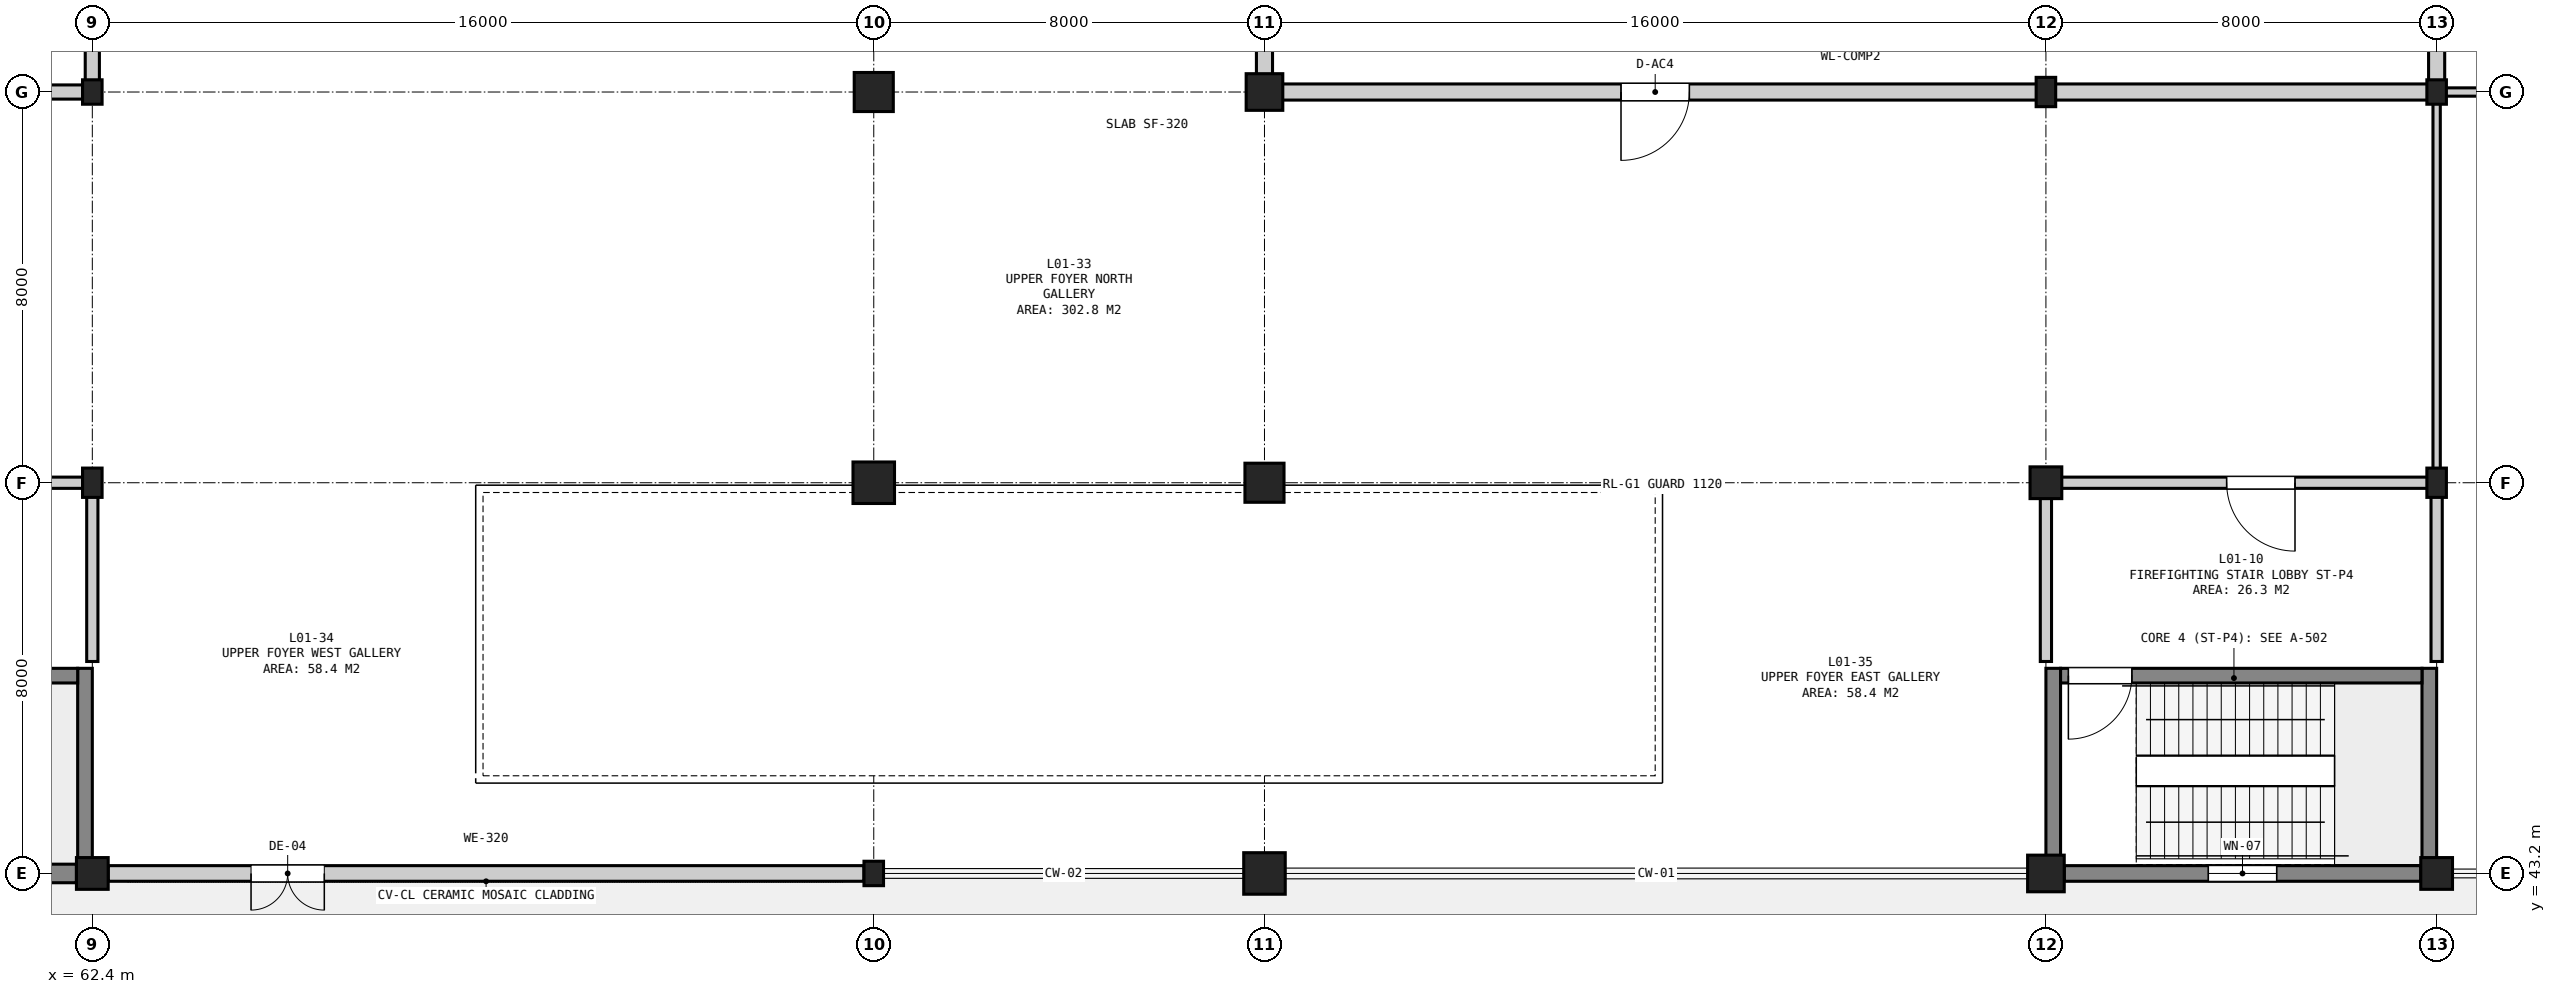
"""IFC4 building model, lengths in metres.
Left out: names, types, materials, properties, quantities, classifications, styles, units other than length and angle.
Written with IfcOpenShell. Run it as: python <this file> out.ifc"""

import sys

from ifc_helpers import new_model, si_unit, direction, frame, frame_2d, origin, origin_2d, place, context, subcontext, project, spatial, rectangle, extrude, element, fill, save


model = new_model("IFC4")
c1 = context("Model", 3, precision=1e-05, world=origin(), true_north=direction((0.0, 1.0)))
c2 = subcontext(c1, "Body", "Model", "MODEL_VIEW")
j1 = project(units=[si_unit("LENGTHUNIT", "METRE"), si_unit("PLANEANGLEUNIT", "RADIAN")], contexts=[c1])
p1 = place(None, origin())
s1 = spatial("IfcSite", under=j1, at=p1, CompositionType="ELEMENT")
p2 = place(p1, origin())
s2 = spatial("IfcBuilding", under=s1, at=p2, CompositionType="ELEMENT")
p3 = place(p2, frame((0.0, 0.0, 5.4)))
s3 = spatial("IfcBuildingStorey", under=s2, at=p3, CompositionType="ELEMENT", Elevation=5.4)
p4 = place(p3, frame((62.4, 43.2, 0.0), z_axis=(0.0, 0.0, 1.0), x_axis=(1.0, 0.0, 0.0)))
e1 = element("IfcColumn", 1, at=p4, inside=s3, PredefinedType="COLUMN", context=c2, shape_type="SweptSolid", body=[
    extrude(rectangle(XDim=0.65, YDim=0.65, at=origin_2d()), origin(), (0.0, 0.0, 1.0), 5.4),
])
p5 = place(p3, frame((62.4, 51.2, 0.0), z_axis=(0.0, 0.0, 1.0), x_axis=(1.0, 0.0, 0.0)))
e2 = element("IfcColumn", 2, at=p5, inside=s3, PredefinedType="COLUMN", context=c2, shape_type="SweptSolid", body=[
    extrude(rectangle(XDim=0.4, YDim=0.6, at=origin_2d()), origin(), (0.0, 0.0, 1.0), 5.4),
])
for number, where, z_axis, x_axis in (
    (3, (62.4, 59.2, 0.0), (0.0, 0.0, 1.0), (1.0, 0.0, 0.0)),
    (4, (78.4, 43.2, 0.0), (0.0, 0.0, 1.0), (1.0, 0.0, 0.0)),
):
    element("IfcColumn", number, at=place(p3, frame(where, z_axis=z_axis, x_axis=x_axis)), inside=s3, PredefinedType="COLUMN", context=c2, shape_type="SweptSolid", body=[
        extrude(rectangle(XDim=0.4, YDim=0.5, at=origin_2d()), origin(), (0.0, 0.0, 1.0), 5.4),
    ])
p6 = place(p3, frame((78.4, 51.2, 0.0), z_axis=(0.0, 0.0, 1.0), x_axis=(1.0, 0.0, 0.0)))
e5 = element("IfcColumn", 5, at=p6, inside=s3, PredefinedType="COLUMN", context=c2, shape_type="SweptSolid", body=[
    extrude(rectangle(XDim=0.85, YDim=0.85, at=origin_2d()), origin(), (0.0, 0.0, 1.0), 5.4),
])
p7 = place(p3, frame((78.4, 59.2, 0.0), z_axis=(0.0, 0.0, 1.0), x_axis=(1.0, 0.0, 0.0)))
e6 = element("IfcColumn", 6, at=p7, inside=s3, PredefinedType="COLUMN", context=c2, shape_type="SweptSolid", body=[
    extrude(rectangle(XDim=0.8, YDim=0.8, at=origin_2d()), origin(), (0.0, 0.0, 1.0), 5.4),
])
p8 = place(p3, frame((86.4, 43.2, 0.0), z_axis=(0.0, 0.0, 1.0), x_axis=(1.0, 0.0, 0.0)))
e7 = element("IfcColumn", 7, at=p8, inside=s3, PredefinedType="COLUMN", context=c2, shape_type="SweptSolid", body=[
    extrude(rectangle(XDim=0.85, YDim=0.85, at=origin_2d()), origin(), (0.0, 0.0, 1.0), 5.4),
])
p9 = place(p3, frame((86.4, 51.2, 0.0), z_axis=(0.0, 0.0, 1.0), x_axis=(1.0, 0.0, 0.0)))
e8 = element("IfcColumn", 8, at=p9, inside=s3, PredefinedType="COLUMN", context=c2, shape_type="SweptSolid", body=[
    extrude(rectangle(XDim=0.8, YDim=0.8, at=origin_2d()), origin(), (0.0, 0.0, 1.0), 5.4),
])
for number, where, z_axis, x_axis in (
    (9, (86.4, 59.2, 0.0), (0.0, 0.0, 1.0), (1.0, 0.0, 0.0)),
    (10, (102.4, 43.2, 0.0), (0.0, 0.0, 1.0), (1.0, 0.0, 0.0)),
):
    element("IfcColumn", number, at=place(p3, frame(where, z_axis=z_axis, x_axis=x_axis)), inside=s3, PredefinedType="COLUMN", context=c2, shape_type="SweptSolid", body=[
        extrude(rectangle(XDim=0.75, YDim=0.75, at=origin_2d()), origin(), (0.0, 0.0, 1.0), 5.4),
    ])
p10 = place(p3, frame((102.4, 51.2, 0.0), z_axis=(0.0, 0.0, 1.0), x_axis=(1.0, 0.0, 0.0)))
e11 = element("IfcColumn", 11, at=p10, inside=s3, PredefinedType="COLUMN", context=c2, shape_type="SweptSolid", body=[
    extrude(rectangle(XDim=0.65, YDim=0.65, at=origin_2d()), origin(), (0.0, 0.0, 1.0), 5.4),
])
p11 = place(p3, frame((102.4, 59.2, 0.0), z_axis=(0.0, 0.0, 1.0), x_axis=(1.0, 0.0, 0.0)))
e12 = element("IfcColumn", 12, at=p11, inside=s3, PredefinedType="COLUMN", context=c2, shape_type="SweptSolid", body=[
    extrude(rectangle(XDim=0.4, YDim=0.6, at=origin_2d()), origin(), (0.0, 0.0, 1.0), 5.4),
])
p12 = place(p3, frame((110.4, 43.2, 0.0), z_axis=(0.0, 0.0, 1.0), x_axis=(1.0, 0.0, 0.0)))
e13 = element("IfcColumn", 13, at=p12, inside=s3, PredefinedType="COLUMN", context=c2, shape_type="SweptSolid", body=[
    extrude(rectangle(XDim=0.65, YDim=0.65, at=origin_2d()), origin(), (0.0, 0.0, 1.0), 5.4),
])
p13 = place(p3, frame((110.4, 51.2, 0.0), z_axis=(0.0, 0.0, 1.0), x_axis=(1.0, 0.0, 0.0)))
e14 = element("IfcColumn", 14, at=p13, inside=s3, PredefinedType="COLUMN", context=c2, shape_type="SweptSolid", body=[
    extrude(rectangle(XDim=0.4, YDim=0.6, at=origin_2d()), origin(), (0.0, 0.0, 1.0), 5.4),
])
p14 = place(p3, frame((110.4, 59.2, 0.0), z_axis=(0.0, 0.0, 1.0), x_axis=(1.0, 0.0, 0.0)))
e15 = element("IfcColumn", 15, at=p14, inside=s3, PredefinedType="COLUMN", context=c2, shape_type="SweptSolid", body=[
    extrude(rectangle(XDim=0.4, YDim=0.5, at=origin_2d()), origin(), (0.0, 0.0, 1.0), 5.4),
])
p15 = place(p3, frame((54.775, 43.2, 0.0), z_axis=(0.0, 0.0, 1.0), x_axis=(1.0, 0.0, 0.0)))
e16 = element("IfcWall", 16, at=p15, inside=s3, PredefinedType="SOLIDWALL", context=c2, shape_type="SweptSolid", body=[
    extrude(rectangle(XDim=7.3, YDim=0.38, at=frame_2d((3.65, 0.0))), origin(), (0.0, 0.0, 1.0), 4.455),
])
p16 = place(p15, frame((2.75, 0.0, 0.9)))
e17 = element("IfcOpeningElement", 17, at=p16, cuts=e16, PredefinedType="OPENING", context=c2, shape_type="SweptSolid", body=[
    extrude(rectangle(XDim=1.8, YDim=2.1, at=frame_2d((0.9, 1.05))), frame((0.0, 0.202, 0.0), z_axis=(0.0, -1.0, 0.0), x_axis=(1.0, 0.0, 0.0)), (0.0, 0.0, 1.0), 0.404),
])
p17 = place(p3, frame((62.725, 43.2, 0.0), z_axis=(0.0, 0.0, 1.0), x_axis=(1.0, 0.0, 0.0)))
e18 = element("IfcWall", 18, at=p17, inside=s3, PredefinedType="SOLIDWALL", context=c2, shape_type="SweptSolid", body=[
    extrude(rectangle(XDim=15.475, YDim=0.32, at=frame_2d((7.737, 0.0))), origin(), (0.0, 0.0, 1.0), 4.025),
])
p18 = place(p17, frame((2.925, 0.0, 0.0)))
e19 = element("IfcOpeningElement", 19, at=p18, cuts=e18, PredefinedType="OPENING", context=c2, shape_type="SweptSolid", body=[
    extrude(rectangle(XDim=1.5, YDim=2.2, at=frame_2d((0.75, 1.1))), frame((0.0, 0.172, 0.0), z_axis=(0.0, -1.0, 0.0), x_axis=(1.0, 0.0, 0.0)), (0.0, 0.0, 1.0), 0.344),
])
p19 = place(p3, frame((102.775, 43.2, 0.0), z_axis=(0.0, 0.0, 1.0), x_axis=(1.0, 0.0, 0.0)))
e20 = element("IfcWall", 20, at=p19, inside=s3, PredefinedType="SOLIDWALL", context=c2, shape_type="SweptSolid", body=[
    extrude(rectangle(XDim=7.3, YDim=0.32, at=frame_2d((3.65, 0.0))), origin(), (0.0, 0.0, 1.0), 4.475),
])
p20 = place(p19, frame((2.95, 0.0, 0.9)))
e21 = element("IfcOpeningElement", 21, at=p20, cuts=e20, PredefinedType="OPENING", context=c2, shape_type="SweptSolid", body=[
    extrude(rectangle(XDim=1.4, YDim=1.8, at=frame_2d((0.7, 0.9))), frame((0.0, 0.172, 0.0), z_axis=(0.0, -1.0, 0.0), x_axis=(1.0, 0.0, 0.0)), (0.0, 0.0, 1.0), 0.344),
])
p21 = place(p3, frame((62.25, 43.2, 0.0), z_axis=(0.0, 0.0, 1.0), x_axis=(0.0, 1.0, 0.0)))
e22 = element("IfcWall", 22, at=p21, inside=s3, PredefinedType="SHEAR", context=c2, shape_type="SweptSolid", body=[
    extrude(rectangle(XDim=4.2, YDim=0.3, at=frame_2d((2.1, 0.0))), origin(), (0.0, 0.0, 1.0), 5.1),
])
p22 = place(p3, frame((54.7, 47.25, 0.0), z_axis=(0.0, 0.0, 1.0), x_axis=(1.0, 0.0, 0.0)))
e23 = element("IfcWall", 23, at=p22, inside=s3, PredefinedType="SHEAR", context=c2, shape_type="SweptSolid", body=[
    extrude(rectangle(XDim=7.4, YDim=0.3, at=frame_2d((3.7, 0.0))), origin(), (0.0, 0.0, 1.0), 5.1),
])
p23 = place(p22, frame((0.16, 0.0, 0.0)))
e24 = element("IfcOpeningElement", 24, at=p23, cuts=e23, PredefinedType="OPENING", context=c2, shape_type="SweptSolid", body=[
    extrude(rectangle(XDim=1.3, YDim=2.18, at=frame_2d((0.65, 1.09))), frame((0.0, 0.162, 0.0), z_axis=(0.0, -1.0, 0.0), x_axis=(1.0, 0.0, 0.0)), (0.0, 0.0, 1.0), 0.324),
])
for number, where, z_axis, x_axis in (
    (25, (102.55, 43.2, 0.0), (0.0, 0.0, 1.0), (0.0, 1.0, 0.0)),
    (26, (110.25, 43.2, 0.0), (0.0, 0.0, 1.0), (0.0, 1.0, 0.0)),
):
    element("IfcWall", number, at=place(p3, frame(where, z_axis=z_axis, x_axis=x_axis)), inside=s3, PredefinedType="SHEAR", context=c2, shape_type="SweptSolid", body=[
        extrude(rectangle(XDim=4.2, YDim=0.3, at=frame_2d((2.1, 0.0))), origin(), (0.0, 0.0, 1.0), 5.1),
    ])
p24 = place(p3, frame((102.7, 47.25, 0.0), z_axis=(0.0, 0.0, 1.0), x_axis=(1.0, 0.0, 0.0)))
e27 = element("IfcWall", 27, at=p24, inside=s3, PredefinedType="SHEAR", context=c2, shape_type="SweptSolid", body=[
    extrude(rectangle(XDim=7.4, YDim=0.3, at=frame_2d((3.7, 0.0))), origin(), (0.0, 0.0, 1.0), 5.1),
])
p25 = place(p24, frame((0.16, 0.0, 0.0)))
e28 = element("IfcOpeningElement", 28, at=p25, cuts=e27, PredefinedType="OPENING", context=c2, shape_type="SweptSolid", body=[
    extrude(rectangle(XDim=1.3, YDim=2.18, at=frame_2d((0.65, 1.09))), frame((0.0, 0.162, 0.0), z_axis=(0.0, -1.0, 0.0), x_axis=(1.0, 0.0, 0.0)), (0.0, 0.0, 1.0), 0.324),
])
p26 = place(p3, frame((54.54, 51.2, 0.0), z_axis=(0.0, 0.0, 1.0), x_axis=(1.0, 0.0, 0.0)))
e29 = element("IfcWall", 29, at=p26, inside=s3, PredefinedType="SOLIDWALL", context=c2, shape_type="SweptSolid", body=[
    extrude(rectangle(XDim=7.72, YDim=0.23, at=frame_2d((3.86, 0.0))), origin(), (0.0, 0.0, 1.0), 4.485),
])
p27 = place(p26, frame((3.56, 0.0, 0.0)))
e30 = element("IfcOpeningElement", 30, at=p27, cuts=e29, PredefinedType="OPENING", context=c2, shape_type="SweptSolid", body=[
    extrude(rectangle(XDim=1.4, YDim=2.2, at=frame_2d((0.7, 1.1))), frame((0.0, 0.127, 0.0), z_axis=(0.0, -1.0, 0.0), x_axis=(1.0, 0.0, 0.0)), (0.0, 0.0, 1.0), 0.254),
])
p28 = place(p3, frame((62.4, 47.54, 0.0), z_axis=(0.0, 0.0, 1.0), x_axis=(0.0, 1.0, 0.0)))
e31 = element("IfcWall", 31, at=p28, inside=s3, PredefinedType="SOLIDWALL", context=c2, shape_type="SweptSolid", body=[
    extrude(rectangle(XDim=3.52, YDim=0.23, at=frame_2d((1.76, 0.0))), origin(), (0.0, 0.0, 1.0), 4.485),
])
p29 = place(p3, frame((102.54, 51.2, 0.0), z_axis=(0.0, 0.0, 1.0), x_axis=(1.0, 0.0, 0.0)))
e32 = element("IfcWall", 32, at=p29, inside=s3, PredefinedType="SOLIDWALL", context=c2, shape_type="SweptSolid", body=[
    extrude(rectangle(XDim=7.72, YDim=0.23, at=frame_2d((3.86, 0.0))), origin(), (0.0, 0.0, 1.0), 4.645),
])
p30 = place(p29, frame((3.56, 0.0, 0.0)))
e33 = element("IfcOpeningElement", 33, at=p30, cuts=e32, PredefinedType="OPENING", context=c2, shape_type="SweptSolid", body=[
    extrude(rectangle(XDim=1.4, YDim=2.2, at=frame_2d((0.7, 1.1))), frame((0.0, 0.127, 0.0), z_axis=(0.0, -1.0, 0.0), x_axis=(1.0, 0.0, 0.0)), (0.0, 0.0, 1.0), 0.254),
])
p31 = place(p3, frame((102.4, 47.54, 0.0), z_axis=(0.0, 0.0, 1.0), x_axis=(0.0, 1.0, 0.0)))
e34 = element("IfcWall", 34, at=p31, inside=s3, PredefinedType="SOLIDWALL", context=c2, shape_type="SweptSolid", body=[
    extrude(rectangle(XDim=3.52, YDim=0.23, at=frame_2d((1.76, 0.0))), origin(), (0.0, 0.0, 1.0), 4.435),
])
p32 = place(p3, frame((110.4, 47.54, 0.0), z_axis=(0.0, 0.0, 1.0), x_axis=(0.0, 1.0, 0.0)))
e35 = element("IfcWall", 35, at=p32, inside=s3, PredefinedType="SOLIDWALL", context=c2, shape_type="SweptSolid", body=[
    extrude(rectangle(XDim=3.52, YDim=0.23, at=frame_2d((1.76, 0.0))), origin(), (0.0, 0.0, 1.0), 4.285),
])
p33 = place(p3, frame((110.54, 59.2, 0.0), z_axis=(0.0, 0.0, 1.0), x_axis=(1.0, 0.0, 0.0)))
e36 = element("IfcWall", 36, at=p33, inside=s3, PredefinedType="PARTITIONING", context=c2, shape_type="SweptSolid", body=[
    extrude(rectangle(XDim=6.12, YDim=0.17, at=frame_2d((3.06, 0.0))), origin(), (0.0, 0.0, 1.0), 4.335),
])
p34 = place(p3, frame((110.4, 51.2, 0.0), z_axis=(0.0, 0.0, 1.0), x_axis=(0.0, 1.0, 0.0)))
e37 = element("IfcWall", 37, at=p34, inside=s3, PredefinedType="PARTITIONING", context=c2, shape_type="SweptSolid", body=[
    extrude(rectangle(XDim=7.86, YDim=0.15, at=frame_2d((3.93, 0.0))), origin(), (0.0, 0.0, 1.0), 4.335),
])
p35 = place(p3, frame((48.14, 59.2, 0.0), z_axis=(0.0, 0.0, 1.0), x_axis=(1.0, 0.0, 0.0)))
e38 = element("IfcWall", 38, at=p35, inside=s3, PredefinedType="SOLIDWALL", context=c2, shape_type="SweptSolid", body=[
    extrude(rectangle(XDim=14.12, YDim=0.29, at=frame_2d((7.06, 0.0))), origin(), (0.0, 0.0, 1.0), 4.535),
])
p36 = place(p35, frame((7.16, 0.0, 0.0)))
e39 = element("IfcOpeningElement", 39, at=p36, cuts=e38, PredefinedType="OPENING", context=c2, shape_type="SweptSolid", body=[
    extrude(rectangle(XDim=1.4, YDim=2.2, at=frame_2d((0.7, 1.1))), frame((0.0, 0.157, 0.0), z_axis=(0.0, -1.0, 0.0), x_axis=(1.0, 0.0, 0.0)), (0.0, 0.0, 1.0), 0.314),
])
p37 = place(p3, frame((62.4, 59.34, 0.0), z_axis=(0.0, 0.0, 1.0), x_axis=(0.0, 1.0, 0.0)))
e40 = element("IfcWall", 40, at=p37, inside=s3, PredefinedType="SOLIDWALL", context=c2, shape_type="SweptSolid", body=[
    extrude(rectangle(XDim=12.52, YDim=0.29, at=frame_2d((6.26, 0.0))), origin(), (0.0, 0.0, 1.0), 4.435),
])
p38 = place(p3, frame((86.54, 59.2, 0.0), z_axis=(0.0, 0.0, 1.0), x_axis=(1.0, 0.0, 0.0)))
e41 = element("IfcWall", 41, at=p38, inside=s3, PredefinedType="SOLIDWALL", context=c2, shape_type="SweptSolid", body=[
    extrude(rectangle(XDim=23.72, YDim=0.33, at=frame_2d((11.86, 0.0))), origin(), (0.0, 0.0, 1.0), 4.385),
])
p39 = place(p38, frame((7.16, 0.0, 0.0)))
e42 = element("IfcOpeningElement", 42, at=p39, cuts=e41, PredefinedType="OPENING", context=c2, shape_type="SweptSolid", body=[
    extrude(rectangle(XDim=1.4, YDim=2.2, at=frame_2d((0.7, 1.1))), frame((0.0, 0.177, 0.0), z_axis=(0.0, -1.0, 0.0), x_axis=(1.0, 0.0, 0.0)), (0.0, 0.0, 1.0), 0.354),
])
p40 = place(p3, frame((86.4, 59.34, 0.0), z_axis=(0.0, 0.0, 1.0), x_axis=(0.0, 1.0, 0.0)))
e43 = element("IfcWall", 43, at=p40, inside=s3, PredefinedType="SOLIDWALL", context=c2, shape_type="SweptSolid", body=[
    extrude(rectangle(XDim=12.52, YDim=0.33, at=frame_2d((6.26, 0.0))), origin(), (0.0, 0.0, 1.0), 4.535),
])
p41 = place(p3, frame((110.4, 59.34, 0.0), z_axis=(0.0, 0.0, 1.0), x_axis=(0.0, 1.0, 0.0)))
e44 = element("IfcWall", 44, at=p41, inside=s3, PredefinedType="SOLIDWALL", context=c2, shape_type="SweptSolid", body=[
    extrude(rectangle(XDim=12.52, YDim=0.33, at=frame_2d((6.26, 0.0))), origin(), (0.0, 0.0, 1.0), 4.235),
])
p42 = place(p18, frame((1.5, 0.0, 0.0), z_axis=(0.0, 0.0, 1.0), x_axis=(-1.0, 0.0, 0.0)))
e45 = element("IfcDoor", 45, at=p42, inside=s3, OperationType="DOUBLE_DOOR_SINGLE_SWING", PredefinedType="DOOR", context=c2, shape_type="SweptSolid", body=[
    extrude(rectangle(XDim=1.5, YDim=2.2, at=frame_2d((0.75, 1.1))), frame((0.0, 0.025, 0.0), z_axis=(0.0, -1.0, 0.0), x_axis=(1.0, 0.0, 0.0)), (0.0, 0.0, 1.0), 0.05),
])
fill(e19, e45)
p43 = place(p20, origin())
e46 = element("IfcWindow", 46, at=p43, inside=s3, PartitioningType="SINGLE_PANEL", PredefinedType="WINDOW", context=c2, shape_type="SweptSolid", body=[
    extrude(rectangle(XDim=1.4, YDim=1.8, at=frame_2d((0.7, 0.9))), frame((0.0, 0.03, 0.0), z_axis=(0.0, -1.0, 0.0), x_axis=(1.0, 0.0, 0.0)), (0.0, 0.0, 1.0), 0.06),
])
fill(e21, e46)
p44 = place(p25, frame((1.3, 0.0, 0.0), z_axis=(0.0, 0.0, 1.0), x_axis=(-1.0, 0.0, 0.0)))
e47 = element("IfcDoor", 47, at=p44, inside=s3, OperationType="SINGLE_SWING_RIGHT", PredefinedType="DOOR", context=c2, shape_type="SweptSolid", body=[
    extrude(rectangle(XDim=1.3, YDim=2.18, at=frame_2d((0.65, 1.09))), frame((0.0, 0.025, 0.0), z_axis=(0.0, -1.0, 0.0), x_axis=(1.0, 0.0, 0.0)), (0.0, 0.0, 1.0), 0.05),
])
fill(e28, e47)
p45 = place(p30, frame((1.4, 0.0, 0.0), z_axis=(0.0, 0.0, 1.0), x_axis=(-1.0, 0.0, 0.0)))
e48 = element("IfcDoor", 48, at=p45, inside=s3, OperationType="SINGLE_SWING_LEFT", PredefinedType="DOOR", context=c2, shape_type="SweptSolid", body=[
    extrude(rectangle(XDim=1.4, YDim=2.2, at=frame_2d((0.7, 1.1))), frame((0.0, 0.025, 0.0), z_axis=(0.0, -1.0, 0.0), x_axis=(1.0, 0.0, 0.0)), (0.0, 0.0, 1.0), 0.05),
])
fill(e33, e48)
p46 = place(p39, frame((1.4, 0.0, 0.0), z_axis=(0.0, 0.0, 1.0), x_axis=(-1.0, 0.0, 0.0)))
e49 = element("IfcDoor", 49, at=p46, inside=s3, OperationType="SINGLE_SWING_RIGHT", PredefinedType="DOOR", context=c2, shape_type="SweptSolid", body=[
    extrude(rectangle(XDim=1.4, YDim=2.2, at=frame_2d((0.7, 1.1))), frame((0.0, 0.025, 0.0), z_axis=(0.0, -1.0, 0.0), x_axis=(1.0, 0.0, 0.0)), (0.0, 0.0, 1.0), 0.05),
])
fill(e42, e49)
save(model, sys.argv[1])
